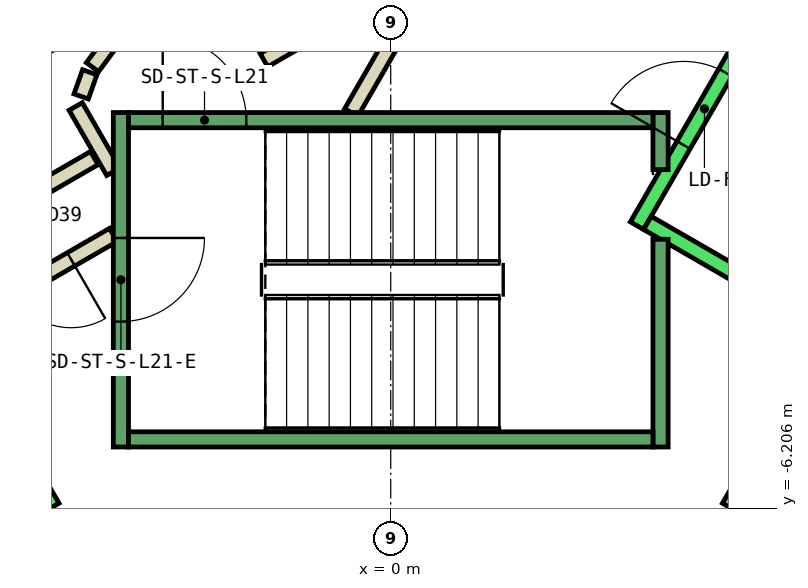
"""IFC4 building model, lengths in metres.
Left out: names, types, materials, properties, quantities, classifications, styles, units other than length and angle.
Written with IfcOpenShell. Run it as: python <this file> out.ifc"""

import sys

from ifc_helpers import new_model, si_unit, direction, frame, frame_2d, origin, place, context, subcontext, project, spatial, rectangle, extrude, element, fill, save


model = new_model("IFC4")
c1 = context("Model", 3, precision=1e-05, world=origin(), true_north=direction((0.0, 1.0)))
c2 = subcontext(c1, "Body", "Model", "MODEL_VIEW")
j1 = project(units=[si_unit("LENGTHUNIT", "METRE"), si_unit("PLANEANGLEUNIT", "RADIAN")], contexts=[c1])
p1 = place(None, origin())
s1 = spatial("IfcSite", under=j1, at=p1, CompositionType="ELEMENT")
p2 = place(p1, origin())
s2 = spatial("IfcBuilding", under=s1, at=p2, CompositionType="ELEMENT")
p3 = place(p2, frame((0.0, 0.0, 99.2)))
s3 = spatial("IfcBuildingStorey", under=s2, at=p3, CompositionType="ELEMENT", Elevation=99.2)
p4 = place(p3, frame((-3.9, -1.599, 0.0), z_axis=(0.0, 0.0, 1.0), x_axis=(-0.865969445389, -0.500096910261, 0.0)))
e1 = element("IfcWall", 1, at=p4, inside=s3, PredefinedType="PARTITIONING", context=c2, shape_type="SweptSolid", body=[
    extrude(rectangle(XDim=1.373, YDim=0.2, at=frame_2d((0.687, 0.0))), origin(), (0.0, 0.0, 1.0), 3.8),
])
p5 = place(p3, frame((-3.65, -2.61, 0.0), z_axis=(0.0, 0.0, 1.0), x_axis=(-0.866072462134, -0.499918483688, 0.0)))
e2 = element("IfcWall", 2, at=p5, inside=s3, PredefinedType="PARTITIONING", context=c2, shape_type="SweptSolid", body=[
    extrude(rectangle(XDim=2.084, YDim=0.2, at=frame_2d((1.042, 0.0))), origin(), (0.0, 0.0, 1.0), 3.8),
])
p6 = place(p5, frame((0.642, 0.0, 0.0)))
e3 = element("IfcOpeningElement", 3, at=p6, cuts=e2, PredefinedType="OPENING", context=c2, shape_type="SweptSolid", body=[
    extrude(rectangle(XDim=0.9, YDim=2.1, at=frame_2d((0.45, 1.05))), frame((0.0, 0.11, 0.0), z_axis=(0.0, -1.0, 0.0), x_axis=(1.0, 0.0, 0.0)), (0.0, 0.0, 1.0), 0.22),
])
p7 = place(p3, frame((-4.145, -0.92, 0.0), z_axis=(0.0, 0.0, 1.0), x_axis=(0.499743786207, -0.866173278362, 0.0)))
e4 = element("IfcWall", 4, at=p7, inside=s3, PredefinedType="PARTITIONING", context=c2, shape_type="SweptSolid", body=[
    extrude(rectangle(XDim=0.991, YDim=0.2, at=frame_2d((0.495, 0.0))), origin(), (0.0, 0.0, 1.0), 3.8),
])
p8 = place(p3, frame((-0.52, -1.0, 0.0), z_axis=(0.0, 0.0, 1.0), x_axis=(0.50011622646, 0.865958290007, 0.0)))
e5 = element("IfcWall", 5, at=p8, inside=s3, PredefinedType="PARTITIONING", context=c2, shape_type="SweptSolid", body=[
    extrude(rectangle(XDim=4.991, YDim=0.2, at=frame_2d((2.496, 0.0))), origin(), (0.0, 0.0, 1.0), 3.8),
])
p9 = place(p8, frame((1.945, 0.0, 0.0)))
e6 = element("IfcOpeningElement", 6, at=p9, cuts=e5, PredefinedType="OPENING", context=c2, shape_type="SweptSolid", body=[
    extrude(rectangle(XDim=1.0, YDim=2.1, at=frame_2d((0.5, 1.05))), frame((0.0, 0.11, 0.0), z_axis=(0.0, -1.0, 0.0), x_axis=(1.0, 0.0, 0.0)), (0.0, 0.0, 1.0), 0.22),
])
p10 = place(p3, frame((-0.412, 0.414, 0.0), z_axis=(0.0, 0.0, 1.0), x_axis=(-0.866017369001, -0.500013916395, 0.0)))
e7 = element("IfcWall", 7, at=p10, inside=s3, PredefinedType="PARTITIONING", context=c2, shape_type="SweptSolid", body=[
    extrude(rectangle(XDim=1.45, YDim=0.2, at=frame_2d((0.725, 0.0))), origin(), (0.0, 0.0, 1.0), 3.8),
])
p11 = place(p3, frame((-3.723, -0.131, 0.0), z_axis=(0.0, 0.0, 1.0), x_axis=(-0.594675113454, -0.803966112121, 0.0)))
e8 = element("IfcWall", 8, at=p11, inside=s3, PredefinedType="PARTITIONING", context=c2, shape_type="SweptSolid", body=[
    extrude(rectangle(XDim=0.338, YDim=0.2, at=frame_2d((0.169, 0.0))), origin(), (0.0, 0.0, 1.0), 3.8),
])
p12 = place(p3, frame((-3.96, -0.47, 0.0), z_axis=(0.0, 0.0, 1.0), x_axis=(-0.334824194261, -0.942280615813, 0.0)))
e9 = element("IfcWall", 9, at=p12, inside=s3, PredefinedType="PARTITIONING", context=c2, shape_type="SweptSolid", body=[
    extrude(rectangle(XDim=0.338, YDim=0.2, at=frame_2d((0.169, 0.0))), origin(), (0.0, 0.0, 1.0), 3.8),
])
p13 = place(p3, frame((-9.751, 2.99, 0.0), z_axis=(0.0, 0.0, 1.0), x_axis=(0.50000090737, -0.866024879913, 0.0)))
e10 = element("IfcWall", 10, at=p13, inside=s3, PredefinedType="STANDARD", context=c2, shape_type="SweptSolid", body=[
    extrude(rectangle(XDim=10.6, YDim=0.2, at=frame_2d((5.3, 0.0))), origin(), (0.0, 0.0, 1.0), 3.8),
])
p14 = place(p3, frame((3.24, -2.488, 0.0), z_axis=(0.0, 0.0, 1.0), x_axis=(0.49994636267, 0.866056369097, 0.0)))
e11 = element("IfcWall", 11, at=p14, inside=s3, PredefinedType="STANDARD", context=c2, shape_type="SweptSolid", body=[
    extrude(rectangle(XDim=2.8, YDim=0.2, at=frame_2d((1.4, 0.0))), origin(), (0.0, 0.0, 1.0), 3.8),
])
p15 = place(p14, frame((1.225, 0.0, 0.0)))
e12 = element("IfcOpeningElement", 12, at=p15, cuts=e11, PredefinedType="OPENING", context=c2, shape_type="SweptSolid", body=[
    extrude(rectangle(XDim=1.1, YDim=2.1, at=frame_2d((0.55, 1.05))), frame((0.0, 0.11, 0.0), z_axis=(0.0, -1.0, 0.0), x_axis=(1.0, 0.0, 0.0)), (0.0, 0.0, 1.0), 0.22),
])
p16 = place(p3, frame((3.377, -2.452, 0.0), z_axis=(0.0, 0.0, 1.0), x_axis=(0.865955154139, -0.50012165622, 0.0)))
e13 = element("IfcWall", 13, at=p16, inside=s3, PredefinedType="STANDARD", context=c2, shape_type="SweptSolid", body=[
    extrude(rectangle(XDim=2.4, YDim=0.2, at=frame_2d((1.2, 0.0))), origin(), (0.0, 0.0, 1.0), 3.8),
])
p17 = place(p3, frame((4.451, -6.19, 0.0), z_axis=(0.0, 0.0, 1.0), x_axis=(0.50000090737, 0.866024879913, 0.0)))
e14 = element("IfcWall", 14, at=p17, inside=s3, PredefinedType="STANDARD", context=c2, shape_type="SweptSolid", body=[
    extrude(rectangle(XDim=10.6, YDim=0.2, at=frame_2d((5.3, 0.0))), origin(), (0.0, 0.0, 1.0), 3.8),
])
p18 = place(p3, frame((-3.55, -1.0, 0.0), z_axis=(0.0, 0.0, 1.0), x_axis=(0.0, -1.0, 0.0)))
e15 = element("IfcWall", 15, at=p18, inside=s3, PredefinedType="STANDARD", context=c2, shape_type="SweptSolid", body=[
    extrude(rectangle(XDim=4.4, YDim=0.2, at=frame_2d((2.2, 0.0))), origin(), (0.0, 0.0, 1.0), 3.8),
])
p19 = place(p18, frame((1.65, 0.0, 0.0)))
e16 = element("IfcOpeningElement", 16, at=p19, cuts=e15, PredefinedType="OPENING", context=c2, shape_type="SweptSolid", body=[
    extrude(rectangle(XDim=1.1, YDim=2.2, at=frame_2d((0.55, 1.1))), frame((0.0, 0.11, 0.0), z_axis=(0.0, -1.0, 0.0), x_axis=(1.0, 0.0, 0.0)), (0.0, 0.0, 1.0), 0.22),
])
p20 = place(p3, frame((3.55, -2.667, 0.0), z_axis=(0.0, 0.0, 1.0), x_axis=(0.0, -1.0, 0.0)))
e17 = element("IfcWall", 17, at=p20, inside=s3, PredefinedType="STANDARD", context=c2, shape_type="SweptSolid", body=[
    extrude(rectangle(XDim=2.733, YDim=0.2, at=frame_2d((1.366, 0.0))), origin(), (0.0, 0.0, 1.0), 3.8),
])
p21 = place(p3, frame((3.55, -1.0, 0.0), z_axis=(0.0, 0.0, 1.0), x_axis=(0.0, -1.0, 0.0)))
e18 = element("IfcWall", 18, at=p21, inside=s3, PredefinedType="STANDARD", context=c2, shape_type="SweptSolid", body=[
    extrude(rectangle(XDim=0.751, YDim=0.2, at=frame_2d((0.375, 0.0))), origin(), (0.0, 0.0, 1.0), 3.8),
])
p22 = place(p3, frame((-3.45, -1.1, 0.0), z_axis=(0.0, 0.0, 1.0), x_axis=(1.0, 0.0, 0.0)))
e19 = element("IfcWall", 19, at=p22, inside=s3, PredefinedType="STANDARD", context=c2, shape_type="SweptSolid", body=[
    extrude(rectangle(XDim=6.9, YDim=0.2, at=frame_2d((3.45, 0.0))), origin(), (0.0, 0.0, 1.0), 3.8),
])
p23 = place(p22, frame((0.45, 0.0, 0.0)))
e20 = element("IfcOpeningElement", 20, at=p23, cuts=e19, PredefinedType="OPENING", context=c2, shape_type="SweptSolid", body=[
    extrude(rectangle(XDim=1.1, YDim=2.2, at=frame_2d((0.55, 1.1))), frame((0.0, 0.11, 0.0), z_axis=(0.0, -1.0, 0.0), x_axis=(1.0, 0.0, 0.0)), (0.0, 0.0, 1.0), 0.22),
])
p24 = place(p3, frame((-3.45, -5.3, 0.0), z_axis=(0.0, 0.0, 1.0), x_axis=(1.0, 0.0, 0.0)))
e21 = element("IfcWall", 21, at=p24, inside=s3, PredefinedType="STANDARD", context=c2, shape_type="SweptSolid", body=[
    extrude(rectangle(XDim=6.9, YDim=0.2, at=frame_2d((3.45, 0.0))), origin(), (0.0, 0.0, 1.0), 3.8),
])
p25 = place(p6, origin())
e22 = element("IfcDoor", 22, at=p25, inside=s3, OperationType="SINGLE_SWING_LEFT", PredefinedType="DOOR", context=c2, shape_type="SweptSolid", body=[
    extrude(rectangle(XDim=0.9, YDim=2.1, at=frame_2d((0.45, 1.05))), frame((0.0, 0.025, 0.0), z_axis=(0.0, -1.0, 0.0), x_axis=(1.0, 0.0, 0.0)), (0.0, 0.0, 1.0), 0.05),
])
fill(e3, e22)
p26 = place(p15, origin())
e23 = element("IfcDoor", 23, at=p26, inside=s3, OperationType="SLIDING_TO_LEFT", PredefinedType="DOOR", context=c2, shape_type="SweptSolid", body=[
    extrude(rectangle(XDim=1.1, YDim=2.1, at=frame_2d((0.55, 1.05))), frame((0.0, 0.025, 0.0), z_axis=(0.0, -1.0, 0.0), x_axis=(1.0, 0.0, 0.0)), (0.0, 0.0, 1.0), 0.05),
])
fill(e12, e23)
p27 = place(p23, origin())
e24 = element("IfcDoor", 24, at=p27, inside=s3, OperationType="SINGLE_SWING_LEFT", PredefinedType="DOOR", context=c2, shape_type="SweptSolid", body=[
    extrude(rectangle(XDim=1.1, YDim=2.2, at=frame_2d((0.55, 1.1))), frame((0.0, 0.025, 0.0), z_axis=(0.0, -1.0, 0.0), x_axis=(1.0, 0.0, 0.0)), (0.0, 0.0, 1.0), 0.05),
])
fill(e20, e24)
p28 = place(p19, origin())
e25 = element("IfcDoor", 25, at=p28, inside=s3, OperationType="SINGLE_SWING_LEFT", PredefinedType="DOOR", context=c2, shape_type="SweptSolid", body=[
    extrude(rectangle(XDim=1.1, YDim=2.2, at=frame_2d((0.55, 1.1))), frame((0.0, 0.025, 0.0), z_axis=(0.0, -1.0, 0.0), x_axis=(1.0, 0.0, 0.0)), (0.0, 0.0, 1.0), 0.05),
])
fill(e16, e25)
save(model, sys.argv[1])
